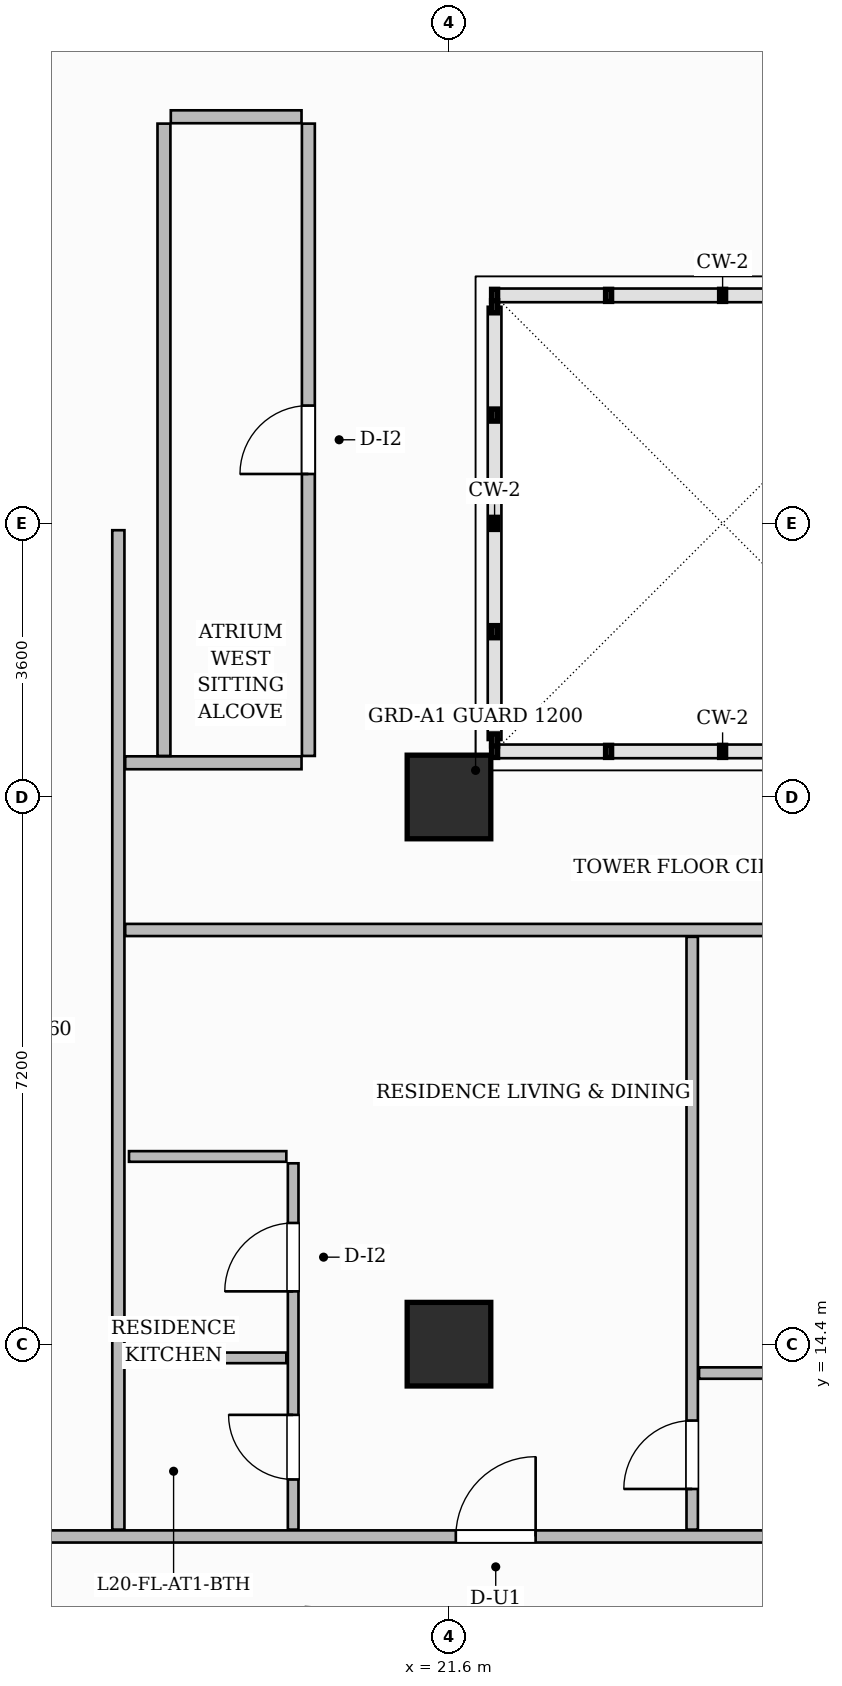
"""IFC4 building model, lengths in metres.
Left out: names, types, materials, properties, quantities, classifications, styles, units other than length and angle.
Written with IfcOpenShell. Run it as: python <this file> out.ifc"""

import sys

from ifc_helpers import new_model, si_unit, direction, frame, frame_2d, origin, origin_2d, place, context, subcontext, project, spatial, rectangle, extrude, source, transform, mapped, element, fill, save


model = new_model("IFC4")
c1 = context("Model", 3, precision=1e-05, world=origin(), true_north=direction((0.0, 1.0)))
c2 = subcontext(c1, "Body", "Model", "MODEL_VIEW")
j1 = project(units=[si_unit("LENGTHUNIT", "METRE"), si_unit("PLANEANGLEUNIT", "RADIAN")], contexts=[c1])
p1 = place(None, origin())
s1 = spatial("IfcSite", under=j1, at=p1, CompositionType="ELEMENT")
p2 = place(p1, origin())
s2 = spatial("IfcBuilding", under=s1, at=p2, CompositionType="ELEMENT")
p3 = place(p2, frame((0.0, 0.0, 84.2)))
s3 = spatial("IfcBuildingStorey", under=s2, at=p3, CompositionType="ELEMENT", Elevation=84.2)
m1 = source(origin(), c2, "Body", "SweptSolid", [
    extrude(rectangle(XDim=1.1, YDim=1.1, at=origin_2d()), origin(), (0.0, 0.0, 1.0), 3.7),
])
for number, where, z_axis, x_axis in (
    (1, (21.6, 14.4, 0.0), (0.0, 0.0, 1.0), (1.0, 0.0, 0.0)),
    (2, (21.6, 21.6, 0.0), (0.0, 0.0, 1.0), (1.0, 0.0, 0.0)),
):
    element("IfcColumn", number, at=place(p3, frame(where, z_axis=z_axis, x_axis=x_axis)), inside=s3, PredefinedType="COLUMN", context=c2, shape_type="MappedRepresentation", body=[
        mapped(m1, transform((0.0, 0.0, 0.0), scale=1.0)),
    ])
p4 = place(p3, frame((14.568, 11.87, 0.0), z_axis=(0.0, 0.0, 1.0), x_axis=(1.0, 0.0, 0.0)))
e3 = element("IfcWall", 3, at=p4, inside=s3, PredefinedType="PARTITIONING", context=c2, shape_type="SweptSolid", body=[
    extrude(rectangle(XDim=15.542, YDim=0.16, at=frame_2d((7.771, 0.0))), origin(), (0.0, 0.0, 1.0), 3.45),
])
p5 = place(p4, frame((7.122, 0.0, 0.0)))
e4 = element("IfcOpeningElement", 4, at=p5, cuts=e3, PredefinedType="OPENING", context=c2, shape_type="SweptSolid", body=[
    extrude(rectangle(XDim=1.05, YDim=2.25, at=frame_2d((0.525, 1.125))), frame((0.0, 0.09, 0.0), z_axis=(0.0, -1.0, 0.0), x_axis=(1.0, 0.0, 0.0)), (0.0, 0.0, 1.0), 0.18),
])
p6 = place(p3, frame((17.25, 11.96, 0.0), z_axis=(0.0, 0.0, 1.0), x_axis=(0.0, 1.0, 0.0)))
e5 = element("IfcWall", 5, at=p6, inside=s3, PredefinedType="PARTITIONING", context=c2, shape_type="SweptSolid", body=[
    extrude(rectangle(XDim=13.15, YDim=0.16, at=frame_2d((6.575, 0.0))), origin(), (0.0, 0.0, 1.0), 3.45),
])
p7 = place(p3, frame((17.34, 22.05, 0.0), z_axis=(0.0, 0.0, 1.0), x_axis=(1.0, 0.0, 0.0)))
e6 = element("IfcWall", 6, at=p7, inside=s3, PredefinedType="PARTITIONING", context=c2, shape_type="SweptSolid", body=[
    extrude(rectangle(XDim=2.32, YDim=0.17, at=frame_2d((1.16, 0.0))), origin(), (0.0, 0.0, 1.0), 3.45),
])
p8 = place(p3, frame((17.94, 30.55, 0.0), z_axis=(0.0, 0.0, 1.0), x_axis=(1.0, 0.0, 0.0)))
e7 = element("IfcWall", 7, at=p8, inside=s3, PredefinedType="PARTITIONING", context=c2, shape_type="SweptSolid", body=[
    extrude(rectangle(XDim=1.72, YDim=0.17, at=frame_2d((0.86, 0.0))), origin(), (0.0, 0.0, 1.0), 3.45),
])
p9 = place(p3, frame((17.85, 22.14, 0.0), z_axis=(0.0, 0.0, 1.0), x_axis=(0.0, 1.0, 0.0)))
e8 = element("IfcWall", 8, at=p9, inside=s3, PredefinedType="PARTITIONING", context=c2, shape_type="SweptSolid", body=[
    extrude(rectangle(XDim=8.32, YDim=0.17, at=frame_2d((4.16, 0.0))), origin(), (0.0, 0.0, 1.0), 3.45),
])
p10 = place(p3, frame((19.75, 22.14, 0.0), z_axis=(0.0, 0.0, 1.0), x_axis=(0.0, 1.0, 0.0)))
e9 = element("IfcWall", 9, at=p10, inside=s3, PredefinedType="PARTITIONING", context=c2, shape_type="SweptSolid", body=[
    extrude(rectangle(XDim=8.32, YDim=0.17, at=frame_2d((4.16, 0.0))), origin(), (0.0, 0.0, 1.0), 3.45),
])
p11 = place(p10, frame((3.71, 0.0, 0.0)))
e10 = element("IfcOpeningElement", 10, at=p11, cuts=e9, PredefinedType="OPENING", context=c2, shape_type="SweptSolid", body=[
    extrude(rectangle(XDim=0.9, YDim=2.15, at=frame_2d((0.45, 1.075))), frame((0.0, 0.095, 0.0), z_axis=(0.0, -1.0, 0.0), x_axis=(1.0, 0.0, 0.0)), (0.0, 0.0, 1.0), 0.19),
])
p12 = place(p3, frame((17.34, 19.85, 0.0), z_axis=(0.0, 0.0, 1.0), x_axis=(1.0, 0.0, 0.0)))
e11 = element("IfcWall", 11, at=p12, inside=s3, PredefinedType="PARTITIONING", context=c2, shape_type="SweptSolid", body=[
    extrude(rectangle(XDim=10.92, YDim=0.16, at=frame_2d((5.46, 0.0))), origin(), (0.0, 0.0, 1.0), 3.45),
])
p13 = place(p3, frame((19.55, 11.96, 0.0), z_axis=(0.0, 0.0, 1.0), x_axis=(0.0, 1.0, 0.0)))
e12 = element("IfcWall", 12, at=p13, inside=s3, PredefinedType="PARTITIONING", context=c2, shape_type="SweptSolid", body=[
    extrude(rectangle(XDim=4.82, YDim=0.14, at=frame_2d((2.41, 0.0))), origin(), (0.0, 0.0, 1.0), 3.45),
])
p14 = place(p13, frame((0.66, 0.0, 0.0)))
e13 = element("IfcOpeningElement", 13, at=p14, cuts=e12, PredefinedType="OPENING", context=c2, shape_type="SweptSolid", body=[
    extrude(rectangle(XDim=0.85, YDim=2.1, at=frame_2d((0.425, 1.05))), frame((0.0, 0.08, 0.0), z_axis=(0.0, -1.0, 0.0), x_axis=(1.0, 0.0, 0.0)), (0.0, 0.0, 1.0), 0.16),
])
p15 = place(p13, frame((3.135, 0.0, 0.0)))
e14 = element("IfcOpeningElement", 14, at=p15, cuts=e12, PredefinedType="OPENING", context=c2, shape_type="SweptSolid", body=[
    extrude(rectangle(XDim=0.9, YDim=2.15, at=frame_2d((0.45, 1.075))), frame((0.0, 0.08, 0.0), z_axis=(0.0, -1.0, 0.0), x_axis=(1.0, 0.0, 0.0)), (0.0, 0.0, 1.0), 0.16),
])
p16 = place(p3, frame((17.39, 14.22, 0.0), z_axis=(0.0, 0.0, 1.0), x_axis=(1.0, 0.0, 0.0)))
e15 = element("IfcWall", 15, at=p16, inside=s3, PredefinedType="PARTITIONING", context=c2, shape_type="SweptSolid", body=[
    extrude(rectangle(XDim=2.07, YDim=0.14, at=frame_2d((1.035, 0.0))), origin(), (0.0, 0.0, 1.0), 2.885),
])
p17 = place(p3, frame((17.39, 16.87, 0.0), z_axis=(0.0, 0.0, 1.0), x_axis=(1.0, 0.0, 0.0)))
e16 = element("IfcWall", 16, at=p17, inside=s3, PredefinedType="PARTITIONING", context=c2, shape_type="SweptSolid", body=[
    extrude(rectangle(XDim=2.07, YDim=0.14, at=frame_2d((1.035, 0.0))), origin(), (0.0, 0.0, 1.0), 3.45),
])
p18 = place(p3, frame((24.8, 11.96, 0.0), z_axis=(0.0, 0.0, 1.0), x_axis=(0.0, 1.0, 0.0)))
e17 = element("IfcWall", 17, at=p18, inside=s3, PredefinedType="PARTITIONING", context=c2, shape_type="SweptSolid", body=[
    extrude(rectangle(XDim=7.8, YDim=0.15, at=frame_2d((3.9, 0.0))), origin(), (0.0, 0.0, 1.0), 3.45),
])
p19 = place(p18, frame((0.535, 0.0, 0.0)))
e18 = element("IfcOpeningElement", 18, at=p19, cuts=e17, PredefinedType="OPENING", context=c2, shape_type="SweptSolid", body=[
    extrude(rectangle(XDim=0.9, YDim=2.15, at=frame_2d((0.45, 1.075))), frame((0.0, 0.085, 0.0), z_axis=(0.0, -1.0, 0.0), x_axis=(1.0, 0.0, 0.0)), (0.0, 0.0, 1.0), 0.17),
])
p20 = place(p3, frame((24.89, 14.02, 0.0), z_axis=(0.0, 0.0, 1.0), x_axis=(1.0, 0.0, 0.0)))
e19 = element("IfcWall", 19, at=p20, inside=s3, PredefinedType="PARTITIONING", context=c2, shape_type="SweptSolid", body=[
    extrude(rectangle(XDim=5.22, YDim=0.15, at=frame_2d((2.61, 0.0))), origin(), (0.0, 0.0, 1.0), 3.45),
])
p21 = place(p20, frame((1.11, 0.0, 0.0)))
e20 = element("IfcOpeningElement", 20, at=p21, cuts=e19, PredefinedType="OPENING", context=c2, shape_type="SweptSolid", body=[
    extrude(rectangle(XDim=0.9, YDim=2.15, at=frame_2d((0.45, 1.075))), frame((0.0, 0.085, 0.0), z_axis=(0.0, -1.0, 0.0), x_axis=(1.0, 0.0, 0.0)), (0.0, 0.0, 1.0), 0.17),
])
m2 = source(origin(), c2, "Body", "SweptSolid", [
    extrude(rectangle(XDim=0.9, YDim=2.15, at=frame_2d((0.45, 1.075))), frame((0.0, 0.025, 0.0), z_axis=(0.0, -1.0, 0.0), x_axis=(1.0, 0.0, 0.0)), (0.0, 0.0, 1.0), 0.05),
])
p22 = place(p11, origin())
e21 = element("IfcDoor", 21, at=p22, inside=s3, OperationType="SINGLE_SWING_LEFT", PredefinedType="DOOR", context=c2, shape_type="MappedRepresentation", body=[
    mapped(m2, transform((0.0, 0.0, 0.0), scale=1.0)),
])
fill(e10, e21)
m3 = source(origin(), c2, "Body", "SweptSolid", [
    extrude(rectangle(XDim=0.85, YDim=2.1, at=frame_2d((0.425, 1.05))), frame((0.0, 0.025, 0.0), z_axis=(0.0, -1.0, 0.0), x_axis=(1.0, 0.0, 0.0)), (0.0, 0.0, 1.0), 0.05),
])
p23 = place(p14, origin())
e22 = element("IfcDoor", 22, at=p23, inside=s3, OperationType="SINGLE_SWING_RIGHT", PredefinedType="DOOR", context=c2, shape_type="MappedRepresentation", body=[
    mapped(m3, transform((0.0, 0.0, 0.0), scale=1.0)),
])
fill(e13, e22)
p24 = place(p15, origin())
e23 = element("IfcDoor", 23, at=p24, inside=s3, OperationType="SINGLE_SWING_LEFT", PredefinedType="DOOR", context=c2, shape_type="MappedRepresentation", body=[
    mapped(m2, transform((0.0, 0.0, 0.0), scale=1.0)),
])
fill(e14, e23)
m4 = source(origin(), c2, "Body", "SweptSolid", [
    extrude(rectangle(XDim=1.05, YDim=2.25, at=frame_2d((0.525, 1.125))), frame((0.0, 0.025, 0.0), z_axis=(0.0, -1.0, 0.0), x_axis=(1.0, 0.0, 0.0)), (0.0, 0.0, 1.0), 0.05),
])
p25 = place(p5, origin())
e24 = element("IfcDoor", 24, at=p25, inside=s3, OperationType="SINGLE_SWING_RIGHT", PredefinedType="DOOR", context=c2, shape_type="MappedRepresentation", body=[
    mapped(m4, transform((0.0, 0.0, 0.0), scale=1.0)),
])
fill(e4, e24)
p26 = place(p19, origin())
e25 = element("IfcDoor", 25, at=p26, inside=s3, OperationType="SINGLE_SWING_LEFT", PredefinedType="DOOR", context=c2, shape_type="MappedRepresentation", body=[
    mapped(m2, transform((0.0, 0.0, 0.0), scale=1.0)),
])
fill(e18, e25)
save(model, sys.argv[1])
